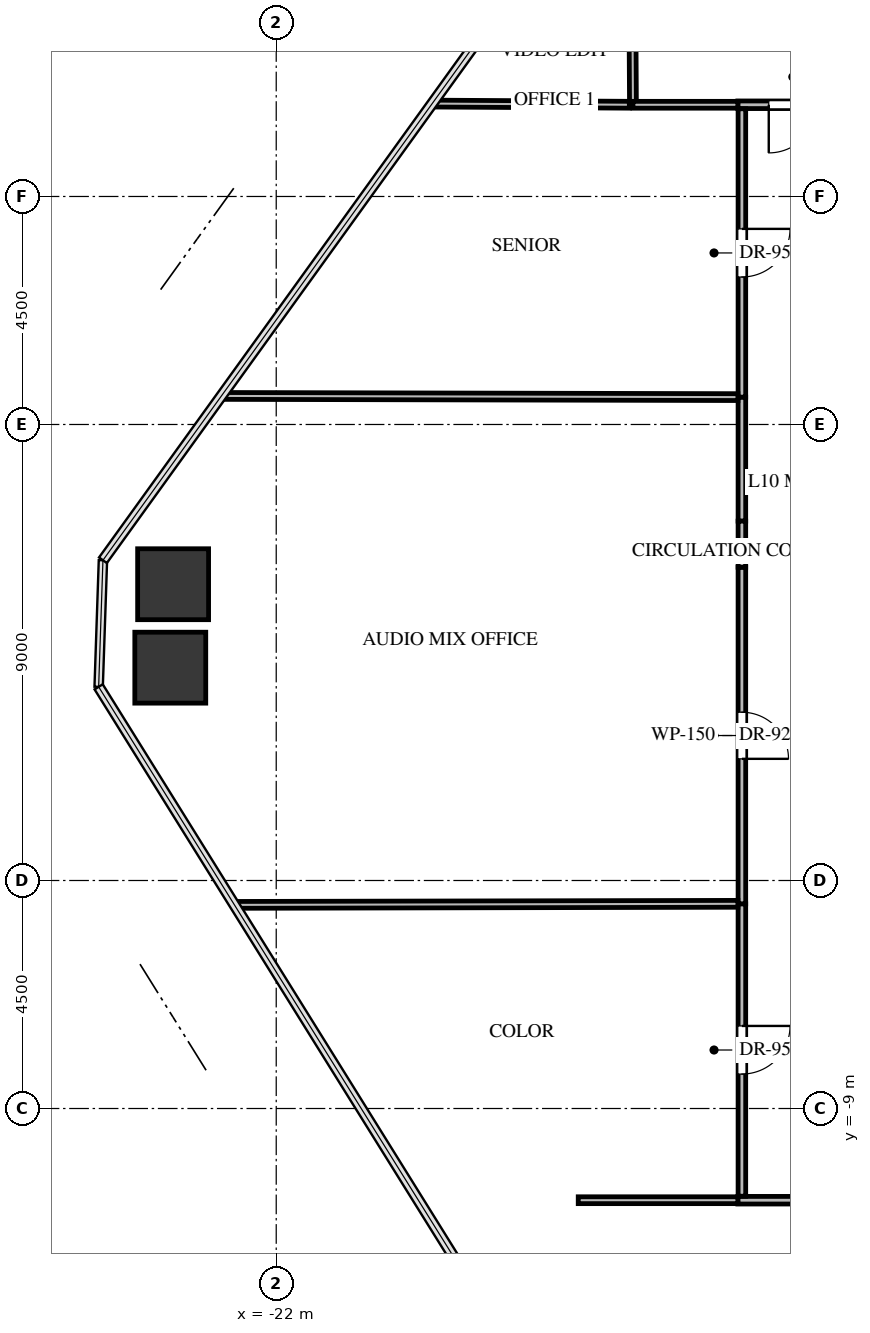
"""IFC4 building model, lengths in metres.
Left out: names, types, materials, properties, quantities, classifications, styles, units other than length and angle.
Written with IfcOpenShell. Run it as: python <this file> out.ifc"""

import sys

from ifc_helpers import new_model, si_unit, direction, frame, frame_2d, origin, origin_2d, place, context, subcontext, project, spatial, rectangle, extrude, source, transform, mapped, element, fill, save


model = new_model("IFC4")
c1 = context("Model", 3, precision=1e-05, world=origin(), true_north=direction((0.0, 1.0)))
c2 = subcontext(c1, "Body", "Model", "MODEL_VIEW")
j1 = project(units=[si_unit("LENGTHUNIT", "METRE"), si_unit("PLANEANGLEUNIT", "RADIAN")], contexts=[c1])
p1 = place(None, origin())
s1 = spatial("IfcSite", under=j1, at=p1, CompositionType="ELEMENT")
p2 = place(p1, origin())
s2 = spatial("IfcBuilding", under=s1, at=p2, CompositionType="ELEMENT")
p3 = place(p2, frame((0.0, 0.0, 45.6)))
s3 = spatial("IfcBuildingStorey", under=s2, at=p3, CompositionType="ELEMENT", Elevation=45.6)
m1 = source(origin(), c2, "Body", "SweptSolid", [
    extrude(rectangle(XDim=1.4, YDim=1.4, at=origin_2d()), origin(), (0.0, 0.0, 1.0), 3.3),
])
for number, where, z_axis, x_axis in (
    (1, (-24.091, -0.3, -0.24), (0.0, 0.0, 1.0), (1.0, 0.0, 0.0)),
    (2, (-24.035, 1.347, -0.24), (0.0, 0.0, 1.0), (1.0, 0.0, 0.0)),
):
    element("IfcColumn", number, at=place(p3, frame(where, z_axis=z_axis, x_axis=x_axis)), inside=s3, PredefinedType="COLUMN", context=c2, shape_type="MappedRepresentation", body=[
        mapped(m1, transform((0.0, 0.0, 0.0), x_axis=(1.0, 0.0, 0.0), y_axis=(0.0, 1.0, 0.0), z_axis=(0.0, 0.0, 1.0), scale=1.0)),
    ])
p4 = place(p3, frame((-10.72, 10.81, 0.0), z_axis=(0.0, 0.0, 1.0), x_axis=(-1.0, 0.0, 0.0)))
e3 = element("IfcWall", 3, at=p4, inside=s3, PredefinedType="PARTITIONING", context=c2, shape_type="SweptSolid", body=[
    extrude(rectangle(XDim=2.17, YDim=0.15, at=frame_2d((1.085, 0.0))), origin(), (0.0, 0.0, 1.0), 3.045),
])
p5 = place(p4, frame((0.61, 0.0, 0.0)))
e4 = element("IfcOpeningElement", 4, at=p5, cuts=e3, PredefinedType="OPENING", context=c2, shape_type="SweptSolid", body=[
    extrude(rectangle(XDim=0.95, YDim=2.1, at=frame_2d((0.475, 1.05))), frame((0.0, 0.085, 0.0), z_axis=(0.0, -1.0, 0.0), x_axis=(1.0, 0.0, 0.0)), (0.0, 0.0, 1.0), 0.17),
])
p6 = place(p3, frame((-12.89, -10.81, 0.0), z_axis=(0.0, 0.0, 1.0), x_axis=(1.0, 0.0, 0.0)))
e5 = element("IfcWall", 5, at=p6, inside=s3, PredefinedType="PARTITIONING", context=c2, shape_type="SweptSolid", body=[
    extrude(rectangle(XDim=3.43, YDim=0.15, at=frame_2d((1.715, 0.0))), origin(), (0.0, 0.0, 1.0), 3.045),
])
p7 = place(p6, frame((1.255, 0.0, 0.0)))
e6 = element("IfcOpeningElement", 6, at=p7, cuts=e5, PredefinedType="OPENING", context=c2, shape_type="SweptSolid", body=[
    extrude(rectangle(XDim=0.92, YDim=2.1, at=frame_2d((0.46, 1.05))), frame((0.0, 0.085, 0.0), z_axis=(0.0, -1.0, 0.0), x_axis=(1.0, 0.0, 0.0)), (0.0, 0.0, 1.0), 0.17),
])
p8 = place(p3, frame((-12.81, -4.96, 0.0), z_axis=(0.0, 0.0, 1.0), x_axis=(0.0, -1.0, 0.0)))
e7 = element("IfcWall", 7, at=p8, inside=s3, PredefinedType="PARTITIONING", context=c2, shape_type="SweptSolid", body=[
    extrude(rectangle(XDim=5.771, YDim=0.15, at=frame_2d((2.885, 0.0))), origin(), (0.0, 0.0, 1.0), 3.045),
])
p9 = place(p8, frame((2.41, 0.0, 0.0)))
e8 = element("IfcOpeningElement", 8, at=p9, cuts=e7, PredefinedType="OPENING", context=c2, shape_type="SweptSolid", body=[
    extrude(rectangle(XDim=0.95, YDim=2.1, at=frame_2d((0.475, 1.05))), frame((0.0, 0.085, 0.0), z_axis=(0.0, -1.0, 0.0), x_axis=(1.0, 0.0, 0.0)), (0.0, 0.0, 1.0), 0.17),
])
p10 = place(p3, frame((-12.81, 5.04, 0.0), z_axis=(0.0, 0.0, 1.0), x_axis=(0.0, -1.0, 0.0)))
e9 = element("IfcWall", 9, at=p10, inside=s3, PredefinedType="PARTITIONING", context=c2, shape_type="SweptSolid", body=[
    extrude(rectangle(XDim=2.448, YDim=0.15, at=frame_2d((1.224, 0.0))), origin(), (0.0, 0.0, 1.0), 3.045),
])
p11 = place(p3, frame((-12.81, 1.682, 0.0), z_axis=(0.0, 0.0, 1.0), x_axis=(0.0, -1.0, 0.0)))
e10 = element("IfcWall", 10, at=p11, inside=s3, PredefinedType="PARTITIONING", context=c2, shape_type="SweptSolid", body=[
    extrude(rectangle(XDim=6.642, YDim=0.15, at=frame_2d((3.321, 0.0))), origin(), (0.0, 0.0, 1.0), 3.045),
])
p12 = place(p11, frame((2.861, 0.0, 0.0)))
e11 = element("IfcOpeningElement", 11, at=p12, cuts=e10, PredefinedType="OPENING", context=c2, shape_type="SweptSolid", body=[
    extrude(rectangle(XDim=0.92, YDim=2.1, at=frame_2d((0.46, 1.05))), frame((0.0, 0.085, 0.0), z_axis=(0.0, -1.0, 0.0), x_axis=(1.0, 0.0, 0.0)), (0.0, 0.0, 1.0), 0.17),
])
p13 = place(p3, frame((-12.81, 2.592, 0.0), z_axis=(0.0, 0.0, 1.0), x_axis=(0.0, -1.0, 0.0)))
e12 = element("IfcWall", 12, at=p13, inside=s3, PredefinedType="PARTITIONING", context=c2, shape_type="SweptSolid", body=[
    extrude(rectangle(XDim=0.91, YDim=0.15, at=frame_2d((0.455, 0.0))), origin(), (0.0, 0.0, 1.0), 2.13),
])
p14 = place(p3, frame((-12.81, 10.731, 0.0), z_axis=(0.0, 0.0, 1.0), x_axis=(0.0, -1.0, 0.0)))
e13 = element("IfcWall", 13, at=p14, inside=s3, PredefinedType="PARTITIONING", context=c2, shape_type="SweptSolid", body=[
    extrude(rectangle(XDim=5.691, YDim=0.15, at=frame_2d((2.845, 0.0))), origin(), (0.0, 0.0, 1.0), 3.045),
])
p15 = place(p14, frame((2.371, 0.0, 0.0)))
e14 = element("IfcOpeningElement", 14, at=p15, cuts=e13, PredefinedType="OPENING", context=c2, shape_type="SweptSolid", body=[
    extrude(rectangle(XDim=0.95, YDim=2.1, at=frame_2d((0.475, 1.05))), frame((0.0, 0.085, 0.0), z_axis=(0.0, -1.0, 0.0), x_axis=(1.0, 0.0, 0.0)), (0.0, 0.0, 1.0), 0.17),
])
p16 = place(p3, frame((-14.992, 16.283, 0.0), z_axis=(0.0, 0.0, 1.0), x_axis=(0.005932363604, -0.999982403376, 0.0)))
e15 = element("IfcWall", 15, at=p16, inside=s3, PredefinedType="PARTITIONING", context=c2, shape_type="SweptSolid", body=[
    extrude(rectangle(XDim=5.473, YDim=0.135, at=frame_2d((2.737, 0.0))), origin(), (0.0, 0.0, 1.0), 2.38),
])
p17 = place(p16, frame((2.287, 0.0, 0.0)))
e16 = element("IfcOpeningElement", 16, at=p17, cuts=e15, PredefinedType="OPENING", context=c2, shape_type="SweptSolid", body=[
    extrude(rectangle(XDim=0.9, YDim=2.05, at=frame_2d((0.45, 1.025))), frame((0.0, 0.078, 0.0), z_axis=(0.0, -1.0, 0.0), x_axis=(1.0, 0.0, 0.0)), (0.0, 0.0, 1.0), 0.155),
])
p18 = place(p3, frame((-15.031, 10.81, 0.0), z_axis=(0.0, 0.0, 1.0), x_axis=(-0.999982229424, 0.005961613542, 0.0)))
e17 = element("IfcWall", 17, at=p18, inside=s3, PredefinedType="PARTITIONING", context=c2, shape_type="SweptSolid", body=[
    extrude(rectangle(XDim=3.89, YDim=0.135, at=frame_2d((1.945, 0.0))), origin(), (0.0, 0.0, 1.0), 2.38),
])
p19 = place(p3, frame((-12.89, 10.81, 0.0), z_axis=(0.0, 0.0, 1.0), x_axis=(-1.0, 0.0, 0.0)))
e18 = element("IfcWall", 18, at=p19, inside=s3, PredefinedType="PARTITIONING", context=c2, shape_type="SweptSolid", body=[
    extrude(rectangle(XDim=2.07, YDim=0.135, at=frame_2d((1.035, 0.0))), origin(), (0.0, 0.0, 1.0), 3.045),
])
p20 = place(p3, frame((-16.04, -10.81, 0.0), z_axis=(0.0, 0.0, 1.0), x_axis=(1.0, 0.0, 0.0)))
e19 = element("IfcWall", 19, at=p20, inside=s3, PredefinedType="PARTITIONING", context=c2, shape_type="SweptSolid", body=[
    extrude(rectangle(XDim=3.15, YDim=0.135, at=frame_2d((1.575, 0.0))), origin(), (0.0, 0.0, 1.0), 3.045),
])
p21 = place(p3, frame((-22.825, -4.981, 0.0), z_axis=(0.0, 0.0, 1.0), x_axis=(0.999997767357, 0.002113121234, 0.0)))
e20 = element("IfcWall", 20, at=p21, inside=s3, PredefinedType="PARTITIONING", context=c2, shape_type="SweptSolid", body=[
    extrude(rectangle(XDim=9.936, YDim=0.135, at=frame_2d((4.968, 0.0))), origin(), (0.0, 0.0, 1.0), 2.38),
])
p22 = place(p3, frame((-23.082, 5.063, 0.0), z_axis=(0.0, 0.0, 1.0), x_axis=(0.999997411176, -0.002275443211, 0.0)))
e21 = element("IfcWall", 21, at=p22, inside=s3, PredefinedType="PARTITIONING", context=c2, shape_type="SweptSolid", body=[
    extrude(rectangle(XDim=10.193, YDim=0.135, at=frame_2d((5.096, 0.0))), origin(), (0.0, 0.0, 1.0), 2.38),
])
m2 = source(origin(), c2, "Body", "SweptSolid", [
    extrude(rectangle(XDim=0.95, YDim=2.1, at=frame_2d((0.475, 1.05))), frame((0.0, 0.025, 0.0), z_axis=(0.0, -1.0, 0.0), x_axis=(1.0, 0.0, 0.0)), (0.0, 0.0, 1.0), 0.05),
])
p23 = place(p5, origin())
e22 = element("IfcDoor", 22, at=p23, inside=s3, OperationType="SINGLE_SWING_RIGHT", PredefinedType="DOOR", context=c2, shape_type="MappedRepresentation", body=[
    mapped(m2, transform((0.0, 0.0, 0.0), x_axis=(1.0, 0.0, 0.0), y_axis=(0.0, 1.0, 0.0), z_axis=(0.0, 0.0, 1.0), scale=1.0)),
])
fill(e4, e22)
m3 = source(origin(), c2, "Body", "SweptSolid", [
    extrude(rectangle(XDim=0.95, YDim=2.1, at=frame_2d((0.475, 1.05))), frame((0.0, 0.025, 0.0), z_axis=(0.0, -1.0, 0.0), x_axis=(1.0, 0.0, 0.0)), (0.0, 0.0, 1.0), 0.05),
])
p24 = place(p9, origin())
e23 = element("IfcDoor", 23, at=p24, inside=s3, OperationType="SINGLE_SWING_LEFT", PredefinedType="DOOR", context=c2, shape_type="MappedRepresentation", body=[
    mapped(m3, transform((0.0, 0.0, 0.0), x_axis=(1.0, 0.0, 0.0), y_axis=(0.0, 1.0, 0.0), z_axis=(0.0, 0.0, 1.0), scale=1.0)),
])
fill(e8, e23)
m4 = source(origin(), c2, "Body", "SweptSolid", [
    extrude(rectangle(XDim=0.92, YDim=2.1, at=frame_2d((0.46, 1.05))), frame((0.0, 0.025, 0.0), z_axis=(0.0, -1.0, 0.0), x_axis=(1.0, 0.0, 0.0)), (0.0, 0.0, 1.0), 0.05),
])
p25 = place(p12, origin())
e24 = element("IfcDoor", 24, at=p25, inside=s3, OperationType="SINGLE_SWING_RIGHT", PredefinedType="DOOR", context=c2, shape_type="MappedRepresentation", body=[
    mapped(m4, transform((0.0, 0.0, 0.0), x_axis=(1.0, 0.0, 0.0), y_axis=(0.0, 1.0, 0.0), z_axis=(0.0, 0.0, 1.0), scale=1.0)),
])
fill(e11, e24)
p26 = place(p15, origin())
e25 = element("IfcDoor", 25, at=p26, inside=s3, OperationType="SINGLE_SWING_LEFT", PredefinedType="DOOR", context=c2, shape_type="MappedRepresentation", body=[
    mapped(m3, transform((0.0, 0.0, 0.0), x_axis=(1.0, 0.0, 0.0), y_axis=(0.0, 1.0, 0.0), z_axis=(0.0, 0.0, 1.0), scale=1.0)),
])
fill(e14, e25)
save(model, sys.argv[1])
